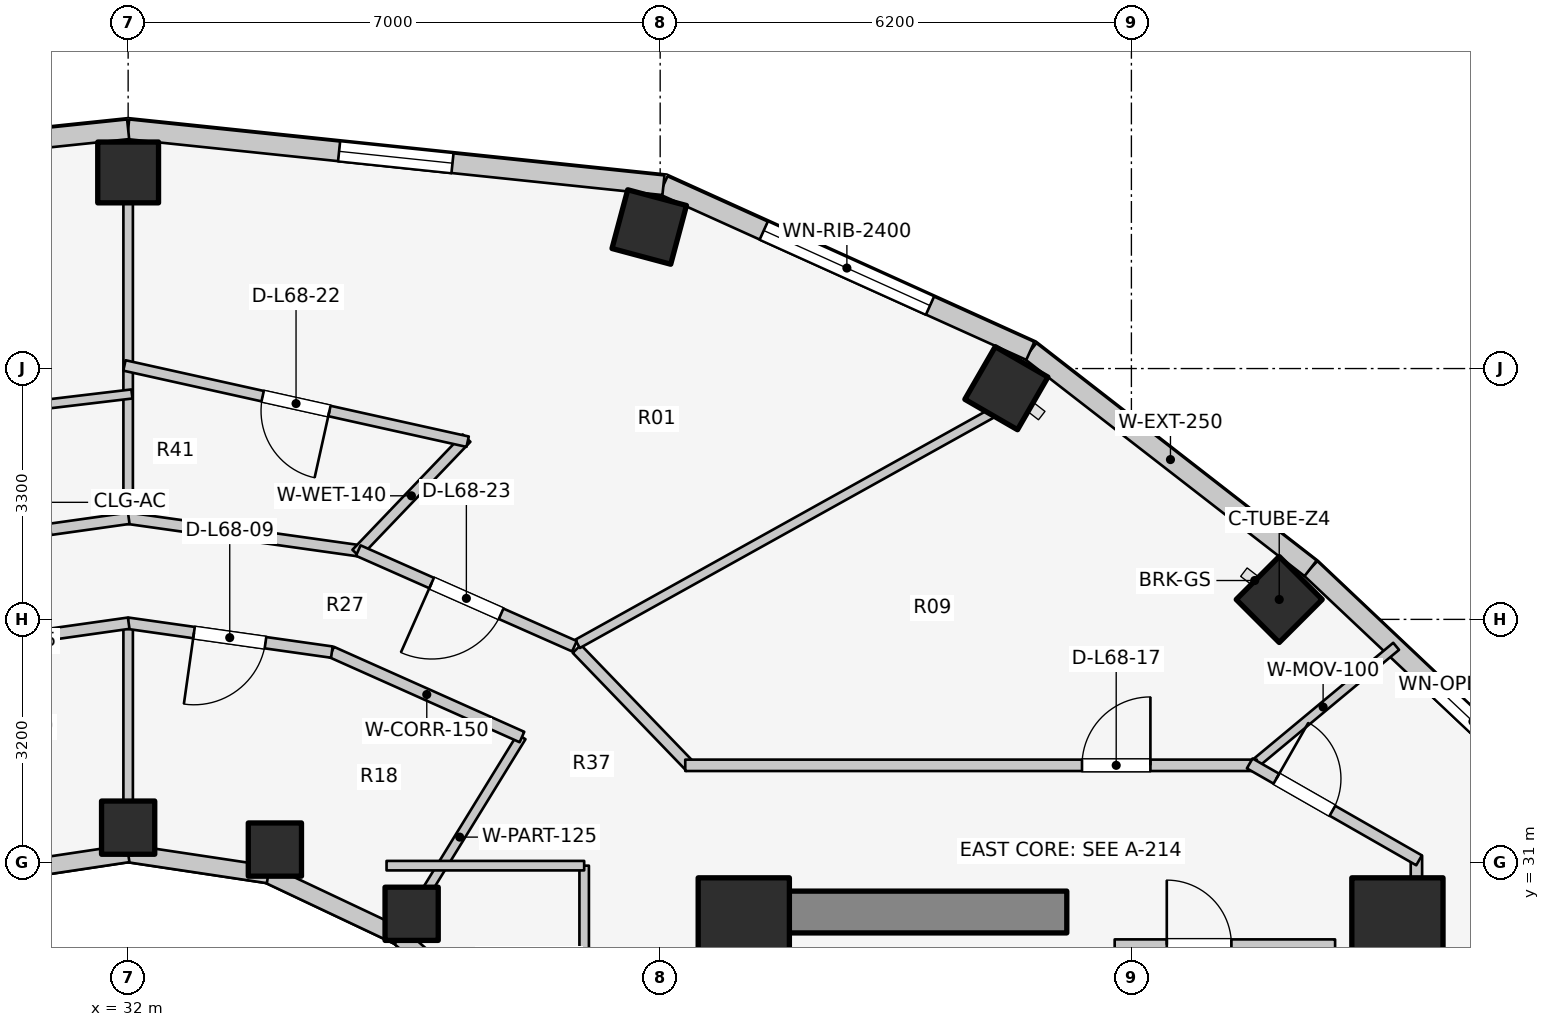
"""IFC4 building model, lengths in metres.
Left out: names, types, materials, properties, quantities, classifications, styles, units other than length and angle.
Written with IfcOpenShell. Run it as: python <this file> out.ifc"""

import sys

from ifc_helpers import new_model, si_unit, direction, frame, frame_2d, origin, origin_2d, place, context, subcontext, project, spatial, rectangle, extrude, element, fill, save


model = new_model("IFC4")
c1 = context("Model", 3, precision=1e-05, world=origin(), true_north=direction((0.0, 1.0)))
c2 = subcontext(c1, "Body", "Model", "MODEL_VIEW")
j1 = project(units=[si_unit("LENGTHUNIT", "METRE"), si_unit("PLANEANGLEUNIT", "RADIAN")], contexts=[c1])
p1 = place(None, origin())
s1 = spatial("IfcSite", under=j1, at=p1, CompositionType="ELEMENT")
p2 = place(p1, origin())
s2 = spatial("IfcBuilding", under=s1, at=p2, CompositionType="ELEMENT")
p3 = place(p2, frame((0.0, 0.0, 223.3)))
s3 = spatial("IfcBuildingStorey", under=s2, at=p3, CompositionType="ELEMENT", Elevation=223.3)
p4 = place(p3, frame((39.85, 30.35, 0.0), z_axis=(0.0, 0.0, 1.0), x_axis=(1.0, 0.0, 0.0)))
e1 = element("IfcWall", 1, at=p4, inside=s3, PredefinedType="SHEAR", context=c2, shape_type="SweptSolid", body=[
    extrude(rectangle(XDim=4.5, YDim=0.55, at=frame_2d((2.25, 0.0))), origin(), (0.0, 0.0, 1.0), 3.1),
])
for number, where, z_axis, x_axis in (
    (2, (48.7, 30.2, 0.0), (0.0, 0.0, 1.0), (1.0, 0.0, 0.0)),
    (3, (40.1, 30.2, 0.0), (0.0, 0.0, 1.0), (1.0, 0.0, 0.0)),
):
    element("IfcColumn", number, at=place(p3, frame(where, z_axis=z_axis, x_axis=x_axis)), inside=s3, PredefinedType="COLUMN", context=c2, shape_type="SweptSolid", body=[
        extrude(rectangle(XDim=1.2, YDim=1.2, at=origin_2d()), origin(), (0.0, 0.0, 1.0), 3.1),
    ])
p5 = place(p3, frame((47.145, 34.462, 0.0), z_axis=(0.0, 0.0, 1.0), x_axis=(0.707106781187, 0.707106781187, 0.0)))
e4 = element("IfcColumn", 4, at=p5, inside=s3, PredefinedType="COLUMN", context=c2, shape_type="SweptSolid", body=[
    extrude(rectangle(XDim=0.8, YDim=0.8, at=origin_2d()), origin(), (0.0, 0.0, 1.0), 3.1),
])
p6 = place(p3, frame((35.73, 30.327, 0.0), z_axis=(0.0, 0.0, 1.0), x_axis=(1.0, 0.0, 0.0)))
e5 = element("IfcColumn", 5, at=p6, inside=s3, PredefinedType="COLUMN", context=c2, shape_type="SweptSolid", body=[
    extrude(rectangle(XDim=0.7, YDim=0.7, at=origin_2d()), origin(), (0.0, 0.0, 1.0), 3.1),
])
p7 = place(p3, frame((43.555, 37.241, 0.0), z_axis=(0.0, 0.0, 1.0), x_axis=(0.5, 0.866025403784, 0.0)))
e6 = element("IfcColumn", 6, at=p7, inside=s3, PredefinedType="COLUMN", context=c2, shape_type="SweptSolid", body=[
    extrude(rectangle(XDim=0.8, YDim=0.8, at=origin_2d()), origin(), (0.0, 0.0, 1.0), 3.1),
])
p8 = place(p3, frame((33.931, 31.172, 0.0), z_axis=(0.0, 0.0, 1.0), x_axis=(1.0, 0.0, 0.0)))
e7 = element("IfcColumn", 7, at=p8, inside=s3, PredefinedType="COLUMN", context=c2, shape_type="SweptSolid", body=[
    extrude(rectangle(XDim=0.7, YDim=0.7, at=origin_2d()), origin(), (0.0, 0.0, 1.0), 3.1),
])
p9 = place(p3, frame((38.856, 39.362, 0.0), z_axis=(0.0, 0.0, 1.0), x_axis=(0.258819045103, 0.965925826289, 0.0)))
e8 = element("IfcColumn", 8, at=p9, inside=s3, PredefinedType="COLUMN", context=c2, shape_type="SweptSolid", body=[
    extrude(rectangle(XDim=0.8, YDim=0.8, at=origin_2d()), origin(), (0.0, 0.0, 1.0), 3.1),
])
p10 = place(p3, frame((32.0, 31.46, 0.0), z_axis=(0.0, 0.0, 1.0), x_axis=(1.0, 0.0, 0.0)))
e9 = element("IfcColumn", 9, at=p10, inside=s3, PredefinedType="COLUMN", context=c2, shape_type="SweptSolid", body=[
    extrude(rectangle(XDim=0.7, YDim=0.7, at=origin_2d()), origin(), (0.0, 0.0, 1.0), 3.1),
])
p11 = place(p3, frame((32.0, 40.08, 0.0), z_axis=(0.0, 0.0, 1.0), x_axis=(0.0, 1.0, 0.0)))
e10 = element("IfcColumn", 10, at=p11, inside=s3, PredefinedType="COLUMN", context=c2, shape_type="SweptSolid", body=[
    extrude(rectangle(XDim=0.8, YDim=0.8, at=origin_2d()), origin(), (0.0, 0.0, 1.0), 3.1),
])
p12 = place(p3, frame((37.035, 28.742, 0.0), z_axis=(0.0, 0.0, 1.0), x_axis=(-0.752576694707, 0.658504607869, 0.0)))
e11 = element("IfcWall", 11, at=p12, inside=s3, PredefinedType="STANDARD", context=c2, shape_type="SweptSolid", body=[
    extrude(rectangle(XDim=1.959, YDim=0.23, at=frame_2d((0.98, 0.0))), origin(), (0.0, 0.0, 1.0), 2.16),
])
p13 = place(p3, frame((35.56, 30.032, 0.0), z_axis=(0.0, 0.0, 1.0), x_axis=(-0.904179699603, 0.427152280606, 0.0)))
e12 = element("IfcWall", 12, at=p13, inside=s3, PredefinedType="STANDARD", context=c2, shape_type="SweptSolid", body=[
    extrude(rectangle(XDim=1.899, YDim=0.23, at=frame_2d((0.95, 0.0))), origin(), (0.0, 0.0, 1.0), 2.16),
])
for number, where, z_axis, x_axis in (
    (13, (33.843, 30.843, 0.0), (0.0, 0.0, 1.0), (-0.989, 0.149, 0.0)),
    (14, (32.0, 31.12, 0.0), (0.0, 0.0, 1.0), (-0.989, -0.149, 0.0)),
):
    element("IfcWall", number, at=place(p3, frame(where, z_axis=z_axis, x_axis=x_axis)), inside=s3, PredefinedType="STANDARD", context=c2, shape_type="SweptSolid", body=[
        extrude(rectangle(XDim=1.864, YDim=0.23, at=frame_2d((0.932, 0.0))), origin(), (0.0, 0.0, 1.0), 2.16),
    ])
p14 = place(p3, frame((50.761, 31.849, 0.0), z_axis=(0.0, 0.0, 1.0), x_axis=(-0.72731899451, 0.686299555752, 0.0)))
e15 = element("IfcWall", 15, at=p14, inside=s3, PredefinedType="STANDARD", context=c2, shape_type="SweptSolid", body=[
    extrude(rectangle(XDim=4.404, YDim=0.26, at=frame_2d((2.202, 0.0))), origin(), (0.0, 0.0, 1.0), 2.85),
])
p15 = place(p14, frame((0.867, 0.0, 0.75)))
e16 = element("IfcOpeningElement", 16, at=p15, cuts=e15, PredefinedType="OPENING", context=c2, shape_type="SweptSolid", body=[
    extrude(rectangle(XDim=1.2, YDim=1.5, at=frame_2d((0.6, 0.75))), frame((0.0, 0.14, 0.0), z_axis=(0.0, -1.0, 0.0), x_axis=(1.0, 0.0, 0.0)), (0.0, 0.0, 1.0), 0.28),
])
p16 = place(p3, frame((47.558, 34.872, 0.0), z_axis=(0.0, 0.0, 1.0), x_axis=(-0.790126214723, 0.612944177563, 0.0)))
e17 = element("IfcWall", 17, at=p16, inside=s3, PredefinedType="STANDARD", context=c2, shape_type="SweptSolid", body=[
    extrude(rectangle(XDim=4.667, YDim=0.26, at=frame_2d((2.333, 0.0))), origin(), (0.0, 0.0, 1.0), 2.85),
])
p17 = place(p3, frame((43.87, 37.733, 0.0), z_axis=(0.0, 0.0, 1.0), x_axis=(-0.911427484938, 0.411460738952, 0.0)))
e18 = element("IfcWall", 18, at=p17, inside=s3, PredefinedType="STANDARD", context=c2, shape_type="SweptSolid", body=[
    extrude(rectangle(XDim=5.296, YDim=0.26, at=frame_2d((2.648, 0.0))), origin(), (0.0, 0.0, 1.0), 2.85),
])
p18 = place(p17, frame((1.448, 0.0, 0.75)))
e19 = element("IfcOpeningElement", 19, at=p18, cuts=e18, PredefinedType="OPENING", context=c2, shape_type="SweptSolid", body=[
    extrude(rectangle(XDim=2.4, YDim=1.7, at=frame_2d((1.2, 0.85))), frame((0.0, 0.14, 0.0), z_axis=(0.0, -1.0, 0.0), x_axis=(1.0, 0.0, 0.0)), (0.0, 0.0, 1.0), 0.28),
])
p19 = place(p3, frame((39.043, 39.912, 0.0), z_axis=(0.0, 0.0, 1.0), x_axis=(-0.994582822721, 0.103947144014, 0.0)))
e20 = element("IfcWall", 20, at=p19, inside=s3, PredefinedType="STANDARD", context=c2, shape_type="SweptSolid", body=[
    extrude(rectangle(XDim=7.081, YDim=0.26, at=frame_2d((3.541, 0.0))), origin(), (0.0, 0.0, 1.0), 2.85),
])
p20 = place(p19, frame((2.791, 0.0, 0.75)))
e21 = element("IfcOpeningElement", 21, at=p20, cuts=e20, PredefinedType="OPENING", context=c2, shape_type="SweptSolid", body=[
    extrude(rectangle(XDim=1.5, YDim=1.6, at=frame_2d((0.75, 0.8))), frame((0.0, 0.14, 0.0), z_axis=(0.0, -1.0, 0.0), x_axis=(1.0, 0.0, 0.0)), (0.0, 0.0, 1.0), 0.28),
])
p21 = place(p3, frame((32.0, 40.648, 0.0), z_axis=(0.0, 0.0, 1.0), x_axis=(-0.994582822721, -0.103947144014, 0.0)))
e22 = element("IfcWall", 22, at=p21, inside=s3, PredefinedType="STANDARD", context=c2, shape_type="SweptSolid", body=[
    extrude(rectangle(XDim=7.081, YDim=0.26, at=frame_2d((3.541, 0.0))), origin(), (0.0, 0.0, 1.0), 2.85),
])
p22 = place(p21, frame((2.791, 0.0, 0.75)))
e23 = element("IfcOpeningElement", 23, at=p22, cuts=e22, PredefinedType="OPENING", context=c2, shape_type="SweptSolid", body=[
    extrude(rectangle(XDim=1.5, YDim=1.6, at=frame_2d((0.75, 0.8))), frame((0.0, 0.14, 0.0), z_axis=(0.0, -1.0, 0.0), x_axis=(1.0, 0.0, 0.0)), (0.0, 0.0, 1.0), 0.28),
])
p23 = place(p3, frame((44.98, 29.92, 0.0), z_axis=(0.0, 0.0, 1.0), x_axis=(1.0, 0.0, 0.0)))
e24 = element("IfcWall", 24, at=p23, inside=s3, PredefinedType="PLUMBINGWALL", context=c2, shape_type="SweptSolid", body=[
    extrude(rectangle(XDim=2.9, YDim=0.14, at=frame_2d((1.45, 0.0))), origin(), (0.0, 0.0, 1.0), 2.855),
])
p24 = place(p23, frame((0.686, 0.0, 0.0)))
e25 = element("IfcOpeningElement", 25, at=p24, cuts=e24, PredefinedType="OPENING", context=c2, shape_type="SweptSolid", body=[
    extrude(rectangle(XDim=0.85, YDim=2.05, at=frame_2d((0.425, 1.025))), frame((0.0, 0.08, 0.0), z_axis=(0.0, -1.0, 0.0), x_axis=(1.0, 0.0, 0.0)), (0.0, 0.0, 1.0), 0.16),
])
p25 = place(p3, frame((35.55, 30.015, 0.0), z_axis=(0.0, 0.0, 1.0), x_axis=(0.523992004803, 0.851723182086, 0.0)))
e26 = element("IfcWall", 26, at=p25, inside=s3, PredefinedType="PARTITIONING", context=c2, shape_type="SweptSolid", body=[
    extrude(rectangle(XDim=3.101, YDim=0.125, at=frame_2d((1.551, 0.0))), origin(), (0.0, 0.0, 1.0), 2.376),
])
p26 = place(p3, frame((32.0, 31.1, 0.0), z_axis=(0.0, 0.0, 1.0), x_axis=(0.0, 1.0, 0.0)))
e27 = element("IfcWall", 27, at=p26, inside=s3, PredefinedType="PARTITIONING", context=c2, shape_type="SweptSolid", body=[
    extrude(rectangle(XDim=3.05, YDim=0.125, at=frame_2d((1.525, 0.0))), origin(), (0.0, 0.0, 1.0), 2.376),
])
p27 = place(p3, frame((37.181, 32.652, 0.0), z_axis=(0.0, 0.0, 1.0), x_axis=(-0.913120130558, 0.407690602257, 0.0)))
e28 = element("IfcWall", 28, at=p27, inside=s3, PredefinedType="PARTITIONING", context=c2, shape_type="SweptSolid", body=[
    extrude(rectangle(XDim=2.743, YDim=0.15, at=frame_2d((1.371, 0.0))), origin(), (0.0, 0.0, 1.0), 2.376),
])
p28 = place(p3, frame((34.68, 33.77, 0.0), z_axis=(0.0, 0.0, 1.0), x_axis=(-0.990132151456, 0.140136799779, 0.0)))
e29 = element("IfcWall", 29, at=p28, inside=s3, PredefinedType="PARTITIONING", context=c2, shape_type="SweptSolid", body=[
    extrude(rectangle(XDim=2.714, YDim=0.15, at=frame_2d((1.357, 0.0))), origin(), (0.0, 0.0, 1.0), 2.376),
])
p29 = place(p28, frame((0.882, 0.0, 0.0)))
e30 = element("IfcOpeningElement", 30, at=p29, cuts=e29, PredefinedType="OPENING", context=c2, shape_type="SweptSolid", body=[
    extrude(rectangle(XDim=0.95, YDim=2.1, at=frame_2d((0.475, 1.05))), frame((0.0, 0.085, 0.0), z_axis=(0.0, -1.0, 0.0), x_axis=(1.0, 0.0, 0.0)), (0.0, 0.0, 1.0), 0.17),
])
p30 = place(p3, frame((32.007, 34.15, 0.0), z_axis=(0.0, 0.0, 1.0), x_axis=(-0.990132151456, -0.140136799779, 0.0)))
e31 = element("IfcWall", 31, at=p30, inside=s3, PredefinedType="PARTITIONING", context=c2, shape_type="SweptSolid", body=[
    extrude(rectangle(XDim=2.714, YDim=0.15, at=frame_2d((1.357, 0.0))), origin(), (0.0, 0.0, 1.0), 2.376),
])
p31 = place(p3, frame((38.0, 25.8, 0.0), z_axis=(0.0, 0.0, 1.0), x_axis=(0.0, 1.0, 0.0)))
e32 = element("IfcWall", 32, at=p31, inside=s3, PredefinedType="PARTITIONING", context=c2, shape_type="SweptSolid", body=[
    extrude(rectangle(XDim=5.16, YDim=0.125, at=frame_2d((2.58, 0.0))), origin(), (0.0, 0.0, 1.0), 2.232),
])
p32 = place(p3, frame((35.4, 30.96, 0.0), z_axis=(0.0, 0.0, 1.0), x_axis=(1.0, 0.0, 0.0)))
e33 = element("IfcWall", 33, at=p32, inside=s3, PredefinedType="PARTITIONING", context=c2, shape_type="SweptSolid", body=[
    extrude(rectangle(XDim=2.6, YDim=0.125, at=frame_2d((1.3, 0.0))), origin(), (0.0, 0.0, 1.0), 2.376),
])
p33 = place(p3, frame((48.95, 29.8, 0.0), z_axis=(0.0, 0.0, 1.0), x_axis=(0.0, 1.0, 0.0)))
e34 = element("IfcWall", 34, at=p33, inside=s3, PredefinedType="PARTITIONING", context=c2, shape_type="SweptSolid", body=[
    extrude(rectangle(XDim=1.29, YDim=0.15, at=frame_2d((0.645, 0.0))), origin(), (0.0, 0.0, 1.0), 2.855),
])
p34 = place(p3, frame((46.762, 32.248, 0.0), z_axis=(0.0, 0.0, 1.0), x_axis=(0.76890954941, 0.639357571962, 0.0)))
e35 = element("IfcWall", 35, at=p34, inside=s3, PredefinedType="MOVABLE", context=c2, shape_type="SweptSolid", body=[
    extrude(rectangle(XDim=2.499, YDim=0.12, at=frame_2d((1.25, 0.0))), origin(), (0.0, 0.0, 1.0), 2.22),
])
p35 = place(p3, frame((37.903, 33.812, 0.0), z_axis=(0.0, 0.0, 1.0), x_axis=(0.694032962553, -0.719943224768, 0.0)))
e36 = element("IfcWall", 36, at=p35, inside=s3, PredefinedType="PARTITIONING", context=c2, shape_type="SweptSolid", body=[
    extrude(rectangle(XDim=2.158, YDim=0.15, at=frame_2d((1.079, 0.0))), origin(), (0.0, 0.0, 1.0), 2.376),
])
p36 = place(p3, frame((39.33, 32.28, 0.0), z_axis=(0.0, 0.0, 1.0), x_axis=(1.0, 0.0, 0.0)))
e37 = element("IfcWall", 37, at=p36, inside=s3, PredefinedType="PARTITIONING", context=c2, shape_type="SweptSolid", body=[
    extrude(rectangle(XDim=7.52, YDim=0.15, at=frame_2d((3.76, 0.0))), origin(), (0.0, 0.0, 1.0), 2.376),
])
p37 = place(p36, frame((5.22, 0.0, 0.0)))
e38 = element("IfcOpeningElement", 38, at=p37, cuts=e37, PredefinedType="OPENING", context=c2, shape_type="SweptSolid", body=[
    extrude(rectangle(XDim=0.9, YDim=2.1, at=frame_2d((0.45, 1.05))), frame((0.0, 0.085, 0.0), z_axis=(0.0, -1.0, 0.0), x_axis=(1.0, 0.0, 0.0)), (0.0, 0.0, 1.0), 0.17),
])
p38 = place(p3, frame((46.757, 32.305, 0.0), z_axis=(0.0, 0.0, 1.0), x_axis=(0.867991349648, -0.496579315857, 0.0)))
e39 = element("IfcWall", 39, at=p38, inside=s3, PredefinedType="PARTITIONING", context=c2, shape_type="SweptSolid", body=[
    extrude(rectangle(XDim=2.567, YDim=0.15, at=frame_2d((1.283, 0.0))), origin(), (0.0, 0.0, 1.0), 2.22),
])
p39 = place(p38, frame((0.404, 0.0, 0.0)))
e40 = element("IfcOpeningElement", 40, at=p39, cuts=e39, PredefinedType="OPENING", context=c2, shape_type="SweptSolid", body=[
    extrude(rectangle(XDim=0.85, YDim=2.05, at=frame_2d((0.425, 1.025))), frame((0.0, 0.085, 0.0), z_axis=(0.0, -1.0, 0.0), x_axis=(1.0, 0.0, 0.0)), (0.0, 0.0, 1.0), 0.17),
])
p40 = place(p3, frame((37.913, 33.878, 0.0), z_axis=(0.0, 0.0, 1.0), x_axis=(0.87377679808, 0.486327160599, 0.0)))
e41 = element("IfcWall", 41, at=p40, inside=s3, PredefinedType="PARTITIONING", context=c2, shape_type="SweptSolid", body=[
    extrude(rectangle(XDim=6.24, YDim=0.125, at=frame_2d((3.12, 0.0))), origin(), (0.0, 0.0, 1.0), 2.376),
])
p41 = place(p3, frame((32.0, 35.585, 0.0), z_axis=(0.0, 0.0, 1.0), x_axis=(0.0, 1.0, 0.0)))
e42 = element("IfcWall", 42, at=p41, inside=s3, PredefinedType="PARTITIONING", context=c2, shape_type="SweptSolid", body=[
    extrude(rectangle(XDim=4.115, YDim=0.125, at=frame_2d((2.058, 0.0))), origin(), (0.0, 0.0, 1.0), 2.376),
])
p42 = place(p3, frame((35.085, 35.096, 0.0), z_axis=(0.0, 0.0, 1.0), x_axis=(-0.990254086283, 0.139272555084, 0.0)))
e43 = element("IfcWall", 43, at=p42, inside=s3, PredefinedType="PARTITIONING", context=c2, shape_type="SweptSolid", body=[
    extrude(rectangle(XDim=3.166, YDim=0.15, at=frame_2d((1.583, 0.0))), origin(), (0.0, 0.0, 1.0), 2.376),
])
p43 = place(p3, frame((35.001, 35.067, 0.0), z_axis=(0.0, 0.0, 1.0), x_axis=(0.691180416361, 0.722682248321, 0.0)))
e44 = element("IfcWall", 44, at=p43, inside=s3, PredefinedType="PLUMBINGWALL", context=c2, shape_type="SweptSolid", body=[
    extrude(rectangle(XDim=2.1, YDim=0.14, at=frame_2d((1.05, 0.0))), origin(), (0.0, 0.0, 1.0), 2.385),
])
p44 = place(p3, frame((36.467, 36.538, 0.0), z_axis=(0.0, 0.0, 1.0), x_axis=(-0.976214372251, 0.21680751696, 0.0)))
e45 = element("IfcWall", 45, at=p44, inside=s3, PredefinedType="PLUMBINGWALL", context=c2, shape_type="SweptSolid", body=[
    extrude(rectangle(XDim=4.626, YDim=0.14, at=frame_2d((2.313, 0.0))), origin(), (0.0, 0.0, 1.0), 2.376),
])
p45 = place(p44, frame((1.863, 0.0, 0.0)))
e46 = element("IfcOpeningElement", 46, at=p45, cuts=e45, PredefinedType="OPENING", context=c2, shape_type="SweptSolid", body=[
    extrude(rectangle(XDim=0.9, YDim=2.1, at=frame_2d((0.45, 1.05))), frame((0.0, 0.08, 0.0), z_axis=(0.0, -1.0, 0.0), x_axis=(1.0, 0.0, 0.0)), (0.0, 0.0, 1.0), 0.16),
])
p46 = place(p3, frame((37.872, 33.847, 0.0), z_axis=(0.0, 0.0, 1.0), x_axis=(-0.914490094652, 0.40460828808, 0.0)))
e47 = element("IfcWall", 47, at=p46, inside=s3, PredefinedType="PARTITIONING", context=c2, shape_type="SweptSolid", body=[
    extrude(rectangle(XDim=3.11, YDim=0.15, at=frame_2d((1.555, 0.0))), origin(), (0.0, 0.0, 1.0), 2.376),
])
p47 = place(p46, frame((1.055, 0.0, 0.0)))
e48 = element("IfcOpeningElement", 48, at=p47, cuts=e47, PredefinedType="OPENING", context=c2, shape_type="SweptSolid", body=[
    extrude(rectangle(XDim=1.0, YDim=2.1, at=frame_2d((0.5, 1.05))), frame((0.0, 0.085, 0.0), z_axis=(0.0, -1.0, 0.0), x_axis=(1.0, 0.0, 0.0)), (0.0, 0.0, 1.0), 0.17),
])
p48 = place(p3, frame((32.05, 37.166, 0.0), z_axis=(0.0, 0.0, 1.0), x_axis=(-0.992963303559, -0.118422454736, 0.0)))
e49 = element("IfcWall", 49, at=p48, inside=s3, PredefinedType="MOVABLE", context=c2, shape_type="SweptSolid", body=[
    extrude(rectangle(XDim=4.622, YDim=0.12, at=frame_2d((2.311, 0.0))), origin(), (0.0, 0.0, 1.0), 2.376),
])
p49 = place(p48, frame((1.836, 0.0, 0.0)))
e50 = element("IfcOpeningElement", 50, at=p49, cuts=e49, PredefinedType="OPENING", context=c2, shape_type="SweptSolid", body=[
    extrude(rectangle(XDim=0.95, YDim=2.1, at=frame_2d((0.475, 1.05))), frame((0.0, 0.07, 0.0), z_axis=(0.0, -1.0, 0.0), x_axis=(1.0, 0.0, 0.0)), (0.0, 0.0, 1.0), 0.14),
])
p50 = place(p3, frame((32.008, 35.53, 0.0), z_axis=(0.0, 0.0, 1.0), x_axis=(-0.990257602807, -0.139247549651, 0.0)))
e51 = element("IfcWall", 51, at=p50, inside=s3, PredefinedType="PARTITIONING", context=c2, shape_type="SweptSolid", body=[
    extrude(rectangle(XDim=3.082, YDim=0.15, at=frame_2d((1.541, 0.0))), origin(), (0.0, 0.0, 1.0), 2.376),
])
p51 = place(p50, frame((1.041, 0.0, 0.0)))
e52 = element("IfcOpeningElement", 52, at=p51, cuts=e51, PredefinedType="OPENING", context=c2, shape_type="SweptSolid", body=[
    extrude(rectangle(XDim=1.0, YDim=2.1, at=frame_2d((0.5, 1.05))), frame((0.0, 0.085, 0.0), z_axis=(0.0, -1.0, 0.0), x_axis=(1.0, 0.0, 0.0)), (0.0, 0.0, 1.0), 0.17),
])
p52 = place(p15, origin())
e53 = element("IfcWindow", 53, at=p52, inside=s3, PartitioningType="SINGLE_PANEL", PredefinedType="WINDOW", context=c2, shape_type="SweptSolid", body=[
    extrude(rectangle(XDim=1.2, YDim=1.5, at=frame_2d((0.6, 0.75))), frame((0.0, 0.03, 0.0), z_axis=(0.0, -1.0, 0.0), x_axis=(1.0, 0.0, 0.0)), (0.0, 0.0, 1.0), 0.06),
])
fill(e16, e53)
p53 = place(p18, origin())
e54 = element("IfcWindow", 54, at=p53, inside=s3, PartitioningType="SINGLE_PANEL", PredefinedType="WINDOW", context=c2, shape_type="SweptSolid", body=[
    extrude(rectangle(XDim=2.4, YDim=1.7, at=frame_2d((1.2, 0.85))), frame((0.0, 0.03, 0.0), z_axis=(0.0, -1.0, 0.0), x_axis=(1.0, 0.0, 0.0)), (0.0, 0.0, 1.0), 0.06),
])
fill(e19, e54)
p54 = place(p20, origin())
e55 = element("IfcWindow", 55, at=p54, inside=s3, PartitioningType="SINGLE_PANEL", PredefinedType="WINDOW", context=c2, shape_type="SweptSolid", body=[
    extrude(rectangle(XDim=1.5, YDim=1.6, at=frame_2d((0.75, 0.8))), frame((0.0, 0.03, 0.0), z_axis=(0.0, -1.0, 0.0), x_axis=(1.0, 0.0, 0.0)), (0.0, 0.0, 1.0), 0.06),
])
fill(e21, e55)
p55 = place(p24, origin())
e56 = element("IfcDoor", 56, at=p55, inside=s3, OperationType="SINGLE_SWING_LEFT", PredefinedType="DOOR", context=c2, shape_type="SweptSolid", body=[
    extrude(rectangle(XDim=0.85, YDim=2.05, at=frame_2d((0.425, 1.025))), frame((0.0, 0.025, 0.0), z_axis=(0.0, -1.0, 0.0), x_axis=(1.0, 0.0, 0.0)), (0.0, 0.0, 1.0), 0.05),
])
fill(e25, e56)
p56 = place(p29, origin())
e57 = element("IfcDoor", 57, at=p56, inside=s3, OperationType="SINGLE_SWING_RIGHT", PredefinedType="DOOR", context=c2, shape_type="SweptSolid", body=[
    extrude(rectangle(XDim=0.95, YDim=2.1, at=frame_2d((0.475, 1.05))), frame((0.0, 0.025, 0.0), z_axis=(0.0, -1.0, 0.0), x_axis=(1.0, 0.0, 0.0)), (0.0, 0.0, 1.0), 0.05),
])
fill(e30, e57)
p57 = place(p37, origin())
e58 = element("IfcDoor", 58, at=p57, inside=s3, OperationType="SINGLE_SWING_RIGHT", PredefinedType="DOOR", context=c2, shape_type="SweptSolid", body=[
    extrude(rectangle(XDim=0.9, YDim=2.1, at=frame_2d((0.45, 1.05))), frame((0.0, 0.025, 0.0), z_axis=(0.0, -1.0, 0.0), x_axis=(1.0, 0.0, 0.0)), (0.0, 0.0, 1.0), 0.05),
])
fill(e38, e58)
p58 = place(p39, origin())
e59 = element("IfcDoor", 59, at=p58, inside=s3, OperationType="SINGLE_SWING_LEFT", PredefinedType="DOOR", context=c2, shape_type="SweptSolid", body=[
    extrude(rectangle(XDim=0.85, YDim=2.05, at=frame_2d((0.425, 1.025))), frame((0.0, 0.025, 0.0), z_axis=(0.0, -1.0, 0.0), x_axis=(1.0, 0.0, 0.0)), (0.0, 0.0, 1.0), 0.05),
])
fill(e40, e59)
p59 = place(p45, origin())
e60 = element("IfcDoor", 60, at=p59, inside=s3, OperationType="SINGLE_SWING_LEFT", PredefinedType="DOOR", context=c2, shape_type="SweptSolid", body=[
    extrude(rectangle(XDim=0.9, YDim=2.1, at=frame_2d((0.45, 1.05))), frame((0.0, 0.025, 0.0), z_axis=(0.0, -1.0, 0.0), x_axis=(1.0, 0.0, 0.0)), (0.0, 0.0, 1.0), 0.05),
])
fill(e46, e60)
p60 = place(p47, origin())
e61 = element("IfcDoor", 61, at=p60, inside=s3, OperationType="SINGLE_SWING_RIGHT", PredefinedType="DOOR", context=c2, shape_type="SweptSolid", body=[
    extrude(rectangle(XDim=1.0, YDim=2.1, at=frame_2d((0.5, 1.05))), frame((0.0, 0.025, 0.0), z_axis=(0.0, -1.0, 0.0), x_axis=(1.0, 0.0, 0.0)), (0.0, 0.0, 1.0), 0.05),
])
fill(e48, e61)
save(model, sys.argv[1])
